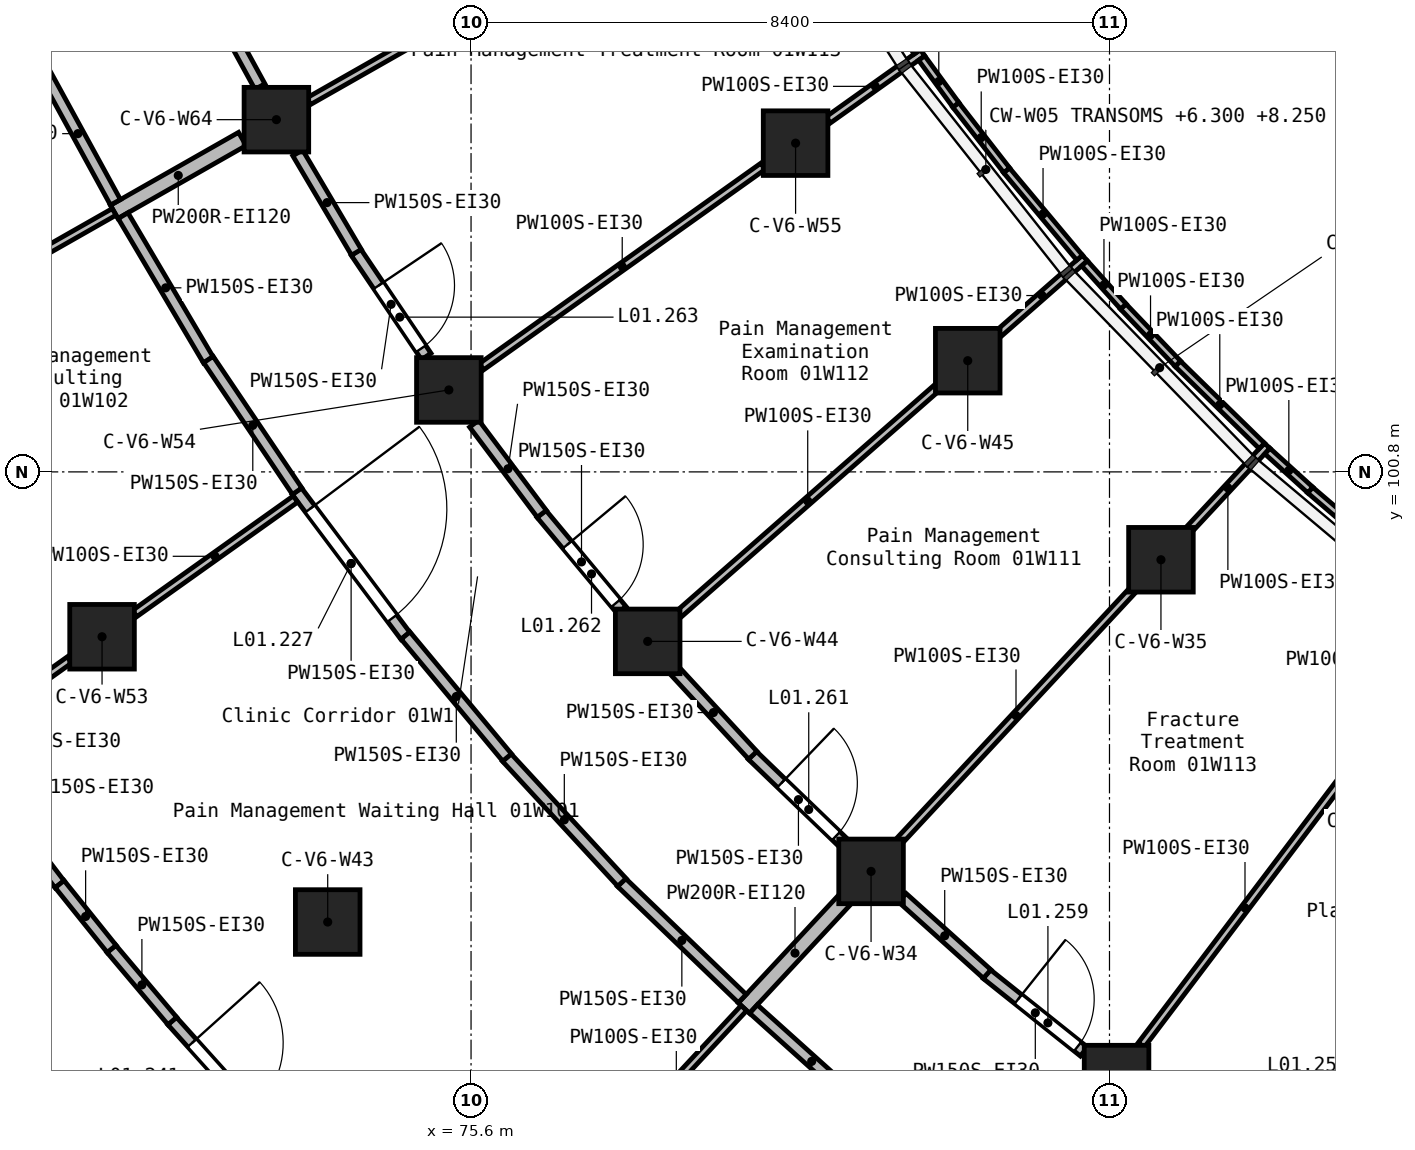
"""IFC4 building model, lengths in metres.
Left out: names, types, materials, properties, quantities, classifications, styles, units other than length and angle.
Written with IfcOpenShell. Run it as: python <this file> out.ifc"""

import sys

from ifc_helpers import new_model, si_unit, direction, frame, frame_2d, origin, origin_2d, place, context, subcontext, project, spatial, rectangle, extrude, element, fill, save


model = new_model("IFC4")
c1 = context("Model", 3, precision=1e-05, world=origin(), true_north=direction((0.0, 1.0)))
c2 = subcontext(c1, "Body", "Model", "MODEL_VIEW")
j1 = project(units=[si_unit("LENGTHUNIT", "METRE"), si_unit("PLANEANGLEUNIT", "RADIAN")], contexts=[c1])
p1 = place(None, origin())
s1 = spatial("IfcSite", under=j1, at=p1, CompositionType="ELEMENT")
p2 = place(p1, origin())
s2 = spatial("IfcBuilding", under=s1, at=p2, CompositionType="ELEMENT")
p3 = place(p2, frame((0.0, 0.0, 5.4)))
s3 = spatial("IfcBuildingStorey", under=s2, at=p3, CompositionType="ELEMENT", Elevation=5.4)
for number, where, z_axis, x_axis in (
    (1, (70.745, 98.631, 0.0), (0.0, 0.0, 1.0), (1.0, 0.0, 0.0)),
    (2, (73.039, 105.434, 0.0), (0.0, 0.0, 1.0), (1.0, 0.0, 0.0)),
    (3, (73.714, 94.878, 0.0), (0.0, 0.0, 1.0), (1.0, 0.0, 0.0)),
    (4, (75.308, 101.878, 0.0), (0.0, 0.0, 1.0), (1.0, 0.0, 0.0)),
    (5, (77.924, 98.57, 0.0), (0.0, 0.0, 1.0), (1.0, 0.0, 0.0)),
    (6, (79.87, 105.125, 0.0), (0.0, 0.0, 1.0), (1.0, 0.0, 0.0)),
    (7, (80.863, 95.544, 0.0), (0.0, 0.0, 1.0), (1.0, 0.0, 0.0)),
    (8, (82.135, 102.263, 0.0), (0.0, 0.0, 1.0), (1.0, 0.0, 0.0)),
    (9, (84.093, 92.831, 0.0), (0.0, 0.0, 1.0), (1.0, 0.0, 0.0)),
    (10, (84.677, 99.644, 0.0), (0.0, 0.0, 1.0), (1.0, 0.0, 0.0)),
):
    element("IfcColumn", number, at=place(p3, frame(where, z_axis=z_axis, x_axis=x_axis)), inside=s3, PredefinedType="COLUMN", context=c2, shape_type="SweptSolid", body=[
        extrude(rectangle(XDim=0.85, YDim=0.85, at=origin_2d()), origin(), (0.0, 0.0, 1.0), 4.5),
    ])
p4 = place(p3, frame((70.905, 104.221, 0.0), z_axis=(0.0, 0.0, 1.0), x_axis=(0.869256176146, 0.494361912198, 0.0)))
e11 = element("IfcWall", 11, at=p4, inside=s3, PredefinedType="SOLIDWALL", context=c2, shape_type="SweptSolid", body=[
    extrude(rectangle(XDim=1.939, YDim=0.2, at=frame_2d((0.97, 0.0))), origin(), (0.0, 0.0, 1.0), 4.15),
])
p5 = place(p3, frame((79.19, 93.746, 0.0), z_axis=(0.0, 0.0, 1.0), x_axis=(0.681171780306, 0.732123627344, 0.0)))
e12 = element("IfcWall", 12, at=p5, inside=s3, PredefinedType="SOLIDWALL", context=c2, shape_type="SweptSolid", body=[
    extrude(rectangle(XDim=1.974, YDim=0.2, at=frame_2d((0.987, 0.0))), origin(), (0.0, 0.0, 1.0), 4.15),
])
p6 = place(p3, frame((73.307, 100.547, 0.0), z_axis=(0.0, 0.0, 1.0), x_axis=(0.600377090661, -0.799717043091, 0.0)))
e13 = element("IfcWall", 13, at=p6, inside=s3, PredefinedType="PARTITIONING", context=c2, shape_type="SweptSolid", body=[
    extrude(rectangle(XDim=2.382, YDim=0.15, at=frame_2d((1.191, 0.0))), origin(), (0.0, 0.0, 1.0), 4.15),
])
p7 = place(p6, frame((0.291, 0.0, 0.0)))
e14 = element("IfcOpeningElement", 14, at=p7, cuts=e13, PredefinedType="OPENING", context=c2, shape_type="SweptSolid", body=[
    extrude(rectangle(XDim=1.8, YDim=2.1, at=frame_2d((0.9, 1.05))), frame((0.0, 0.085, 0.0), z_axis=(0.0, -1.0, 0.0), x_axis=(1.0, 0.0, 0.0)), (0.0, 0.0, 1.0), 0.17),
])
p8 = place(p3, frame((77.579, 95.4, 0.0), z_axis=(0.0, 0.0, 1.0), x_axis=(0.720594722174, -0.693356507415, 0.0)))
e15 = element("IfcWall", 15, at=p8, inside=s3, PredefinedType="PARTITIONING", context=c2, shape_type="SweptSolid", body=[
    extrude(rectangle(XDim=2.205, YDim=0.15, at=frame_2d((1.103, 0.0))), origin(), (0.0, 0.0, 1.0), 4.15),
])
p9 = place(p3, frame((76.069, 97.043, 0.0), z_axis=(0.0, 0.0, 1.0), x_axis=(0.678030610295, -0.735033666918, 0.0)))
e16 = element("IfcWall", 16, at=p9, inside=s3, PredefinedType="PARTITIONING", context=c2, shape_type="SweptSolid", body=[
    extrude(rectangle(XDim=2.236, YDim=0.15, at=frame_2d((1.118, 0.0))), origin(), (0.0, 0.0, 1.0), 4.15),
])
p10 = place(p3, frame((71.021, 104.171, 0.0), z_axis=(0.0, 0.0, 1.0), x_axis=(0.50873677225, -0.860922119916, 0.0)))
e17 = element("IfcWall", 17, at=p10, inside=s3, PredefinedType="PARTITIONING", context=c2, shape_type="SweptSolid", body=[
    extrude(rectangle(XDim=2.205, YDim=0.15, at=frame_2d((1.103, 0.0))), origin(), (0.0, 0.0, 1.0), 4.15),
])
p11 = place(p3, frame((79.316, 93.733, 0.0), z_axis=(0.0, 0.0, 1.0), x_axis=(0.74346507851, -0.668774758073, 0.0)))
e18 = element("IfcWall", 18, at=p11, inside=s3, PredefinedType="PARTITIONING", context=c2, shape_type="SweptSolid", body=[
    extrude(rectangle(XDim=2.059, YDim=0.15, at=frame_2d((1.03, 0.0))), origin(), (0.0, 0.0, 1.0), 4.15),
])
p12 = place(p3, frame((72.145, 102.278, 0.0), z_axis=(0.0, 0.0, 1.0), x_axis=(0.558900636953, -0.829234633873, 0.0)))
e19 = element("IfcWall", 19, at=p12, inside=s3, PredefinedType="PARTITIONING", context=c2, shape_type="SweptSolid", body=[
    extrude(rectangle(XDim=2.089, YDim=0.15, at=frame_2d((1.044, 0.0))), origin(), (0.0, 0.0, 1.0), 4.15),
])
p13 = place(p3, frame((74.738, 98.647, 0.0), z_axis=(0.0, 0.0, 1.0), x_axis=(0.640000381719, -0.768374590548, 0.0)))
e20 = element("IfcWall", 20, at=p13, inside=s3, PredefinedType="PARTITIONING", context=c2, shape_type="SweptSolid", body=[
    extrude(rectangle(XDim=2.088, YDim=0.15, at=frame_2d((1.044, 0.0))), origin(), (0.0, 0.0, 1.0), 4.15),
])
p14 = place(p3, frame((69.933, 106.153, 0.0), z_axis=(0.0, 0.0, 1.0), x_axis=(0.479964929401, -0.877287676047, 0.0)))
e21 = element("IfcWall", 21, at=p14, inside=s3, PredefinedType="PARTITIONING", context=c2, shape_type="SweptSolid", body=[
    extrude(rectangle(XDim=2.059, YDim=0.15, at=frame_2d((1.03, 0.0))), origin(), (0.0, 0.0, 1.0), 4.15),
])
p15 = place(p3, frame((74.086, 103.69, 0.0), z_axis=(0.0, 0.0, 1.0), x_axis=(0.558985889655, -0.829177167538, 0.0)))
e22 = element("IfcWall", 22, at=p15, inside=s3, PredefinedType="PARTITIONING", context=c2, shape_type="SweptSolid", body=[
    extrude(rectangle(XDim=1.654, YDim=0.15, at=frame_2d((0.827, 0.0))), origin(), (0.0, 0.0, 1.0), 4.15),
])
p16 = place(p15, frame((0.53, 0.0, 0.0)))
e23 = element("IfcOpeningElement", 23, at=p16, cuts=e22, PredefinedType="OPENING", context=c2, shape_type="SweptSolid", body=[
    extrude(rectangle(XDim=1.0, YDim=2.1, at=frame_2d((0.5, 1.05))), frame((0.0, 0.085, 0.0), z_axis=(0.0, -1.0, 0.0), x_axis=(1.0, 0.0, 0.0)), (0.0, 0.0, 1.0), 0.17),
])
p17 = place(p3, frame((82.385, 94.194, 0.0), z_axis=(0.0, 0.0, 1.0), x_axis=(0.781756052881, -0.623584375833, 0.0)))
e24 = element("IfcWall", 24, at=p17, inside=s3, PredefinedType="PARTITIONING", context=c2, shape_type="SweptSolid", body=[
    extrude(rectangle(XDim=1.636, YDim=0.15, at=frame_2d((0.818, 0.0))), origin(), (0.0, 0.0, 1.0), 4.15),
])
p18 = place(p17, frame((0.53, 0.0, 0.0)))
e25 = element("IfcOpeningElement", 25, at=p18, cuts=e24, PredefinedType="OPENING", context=c2, shape_type="SweptSolid", body=[
    extrude(rectangle(XDim=1.0, YDim=2.1, at=frame_2d((0.5, 1.05))), frame((0.0, 0.085, 0.0), z_axis=(0.0, -1.0, 0.0), x_axis=(1.0, 0.0, 0.0)), (0.0, 0.0, 1.0), 0.17),
])
p19 = place(p3, frame((79.301, 97.072, 0.0), z_axis=(0.0, 0.0, 1.0), x_axis=(0.720465115712, -0.69349118022, 0.0)))
e26 = element("IfcWall", 26, at=p19, inside=s3, PredefinedType="PARTITIONING", context=c2, shape_type="SweptSolid", body=[
    extrude(rectangle(XDim=1.684, YDim=0.15, at=frame_2d((0.842, 0.0))), origin(), (0.0, 0.0, 1.0), 4.15),
])
p20 = place(p19, frame((0.53, 0.0, 0.0)))
e27 = element("IfcOpeningElement", 27, at=p20, cuts=e26, PredefinedType="OPENING", context=c2, shape_type="SweptSolid", body=[
    extrude(rectangle(XDim=1.0, YDim=2.1, at=frame_2d((0.5, 1.05))), frame((0.0, 0.085, 0.0), z_axis=(0.0, -1.0, 0.0), x_axis=(1.0, 0.0, 0.0)), (0.0, 0.0, 1.0), 0.17),
])
p21 = place(p3, frame((78.27, 98.195, 0.0), z_axis=(0.0, 0.0, 1.0), x_axis=(0.678273469528, -0.73480956753, 0.0)))
e28 = element("IfcWall", 28, at=p21, inside=s3, PredefinedType="PARTITIONING", context=c2, shape_type="SweptSolid", body=[
    extrude(rectangle(XDim=1.529, YDim=0.15, at=frame_2d((0.764, 0.0))), origin(), (0.0, 0.0, 1.0), 4.15),
])
p22 = place(p3, frame((76.526, 100.249, 0.0), z_axis=(0.0, 0.0, 1.0), x_axis=(0.640038659854, -0.768342706019, 0.0)))
e29 = element("IfcWall", 29, at=p22, inside=s3, PredefinedType="PARTITIONING", context=c2, shape_type="SweptSolid", body=[
    extrude(rectangle(XDim=1.648, YDim=0.15, at=frame_2d((0.824, 0.0))), origin(), (0.0, 0.0, 1.0), 4.15),
])
p23 = place(p22, frame((0.53, 0.0, 0.0)))
e30 = element("IfcOpeningElement", 30, at=p23, cuts=e29, PredefinedType="OPENING", context=c2, shape_type="SweptSolid", body=[
    extrude(rectangle(XDim=1.0, YDim=2.1, at=frame_2d((0.5, 1.05))), frame((0.0, 0.085, 0.0), z_axis=(0.0, -1.0, 0.0), x_axis=(1.0, 0.0, 0.0)), (0.0, 0.0, 1.0), 0.17),
])
p24 = place(p3, frame((73.319, 104.997, 0.0), z_axis=(0.0, 0.0, 1.0), x_axis=(0.508740142918, -0.86092012811, 0.0)))
e31 = element("IfcWall", 31, at=p24, inside=s3, PredefinedType="PARTITIONING", context=c2, shape_type="SweptSolid", body=[
    extrude(rectangle(XDim=1.519, YDim=0.15, at=frame_2d((0.759, 0.0))), origin(), (0.0, 0.0, 1.0), 4.15),
])
p25 = place(p3, frame((75.641, 101.434, 0.0), z_axis=(0.0, 0.0, 1.0), x_axis=(0.60023710435, -0.799822116825, 0.0)))
e32 = element("IfcWall", 32, at=p25, inside=s3, PredefinedType="PARTITIONING", context=c2, shape_type="SweptSolid", body=[
    extrude(rectangle(XDim=1.483, YDim=0.15, at=frame_2d((0.741, 0.0))), origin(), (0.0, 0.0, 1.0), 4.15),
])
p26 = place(p3, frame((81.273, 95.199, 0.0), z_axis=(0.0, 0.0, 1.0), x_axis=(0.743576936712, -0.668650386368, 0.0)))
e33 = element("IfcWall", 33, at=p26, inside=s3, PredefinedType="PARTITIONING", context=c2, shape_type="SweptSolid", body=[
    extrude(rectangle(XDim=1.502, YDim=0.15, at=frame_2d((0.751, 0.0))), origin(), (0.0, 0.0, 1.0), 4.15),
])
p27 = place(p3, frame((72.077, 107.232, 0.0), z_axis=(0.0, 0.0, 1.0), x_axis=(0.480041086357, -0.877246006209, 0.0)))
e34 = element("IfcWall", 34, at=p27, inside=s3, PredefinedType="PARTITIONING", context=c2, shape_type="SweptSolid", body=[
    extrude(rectangle(XDim=1.553, YDim=0.15, at=frame_2d((0.777, 0.0))), origin(), (0.0, 0.0, 1.0), 4.15),
])
p28 = place(p3, frame((71.667, 93.577, 0.0), z_axis=(0.0, 0.0, 1.0), x_axis=(0.668733315137, -0.743502355898, 0.0)))
e35 = element("IfcWall", 35, at=p28, inside=s3, PredefinedType="PARTITIONING", context=c2, shape_type="SweptSolid", body=[
    extrude(rectangle(XDim=1.982, YDim=0.15, at=frame_2d((0.991, 0.0))), origin(), (0.0, 0.0, 1.0), 4.15),
])
p29 = place(p28, frame((0.391, 0.0, 0.0)))
e36 = element("IfcOpeningElement", 36, at=p29, cuts=e35, PredefinedType="OPENING", context=c2, shape_type="SweptSolid", body=[
    extrude(rectangle(XDim=1.2, YDim=2.1, at=frame_2d((0.6, 1.05))), frame((0.0, 0.085, 0.0), z_axis=(0.0, -1.0, 0.0), x_axis=(1.0, 0.0, 0.0)), (0.0, 0.0, 1.0), 0.17),
])
p30 = place(p3, frame((69.433, 96.362, 0.0), z_axis=(0.0, 0.0, 1.0), x_axis=(0.606457599152, -0.795115828311, 0.0)))
e37 = element("IfcWall", 37, at=p30, inside=s3, PredefinedType="PARTITIONING", context=c2, shape_type="SweptSolid", body=[
    extrude(rectangle(XDim=1.242, YDim=0.15, at=frame_2d((0.621, 0.0))), origin(), (0.0, 0.0, 1.0), 4.15),
])
p31 = place(p3, frame((70.869, 94.525, 0.0), z_axis=(0.0, 0.0, 1.0), x_axis=(0.645236922374, -0.763982535144, 0.0)))
e38 = element("IfcWall", 38, at=p31, inside=s3, PredefinedType="PARTITIONING", context=c2, shape_type="SweptSolid", body=[
    extrude(rectangle(XDim=1.242, YDim=0.15, at=frame_2d((0.621, 0.0))), origin(), (0.0, 0.0, 1.0), 4.15),
])
p32 = place(p3, frame((70.187, 95.377, 0.0), z_axis=(0.0, 0.0, 1.0), x_axis=(0.626301399266, -0.779581013928, 0.0)))
e39 = element("IfcWall", 39, at=p32, inside=s3, PredefinedType="PARTITIONING", context=c2, shape_type="SweptSolid", body=[
    extrude(rectangle(XDim=1.093, YDim=0.15, at=frame_2d((0.546, 0.0))), origin(), (0.0, 0.0, 1.0), 4.15),
])
p33 = place(p3, frame((84.418, 93.26, 0.0), z_axis=(0.0, 0.0, 1.0), x_axis=(0.603501117064, 0.797362152163, 0.0)))
e40 = element("IfcWall", 40, at=p33, inside=s3, PredefinedType="PARTITIONING", context=c2, shape_type="SweptSolid", body=[
    extrude(rectangle(XDim=4.522, YDim=0.1, at=frame_2d((2.261, 0.0))), origin(), (0.0, 0.0, 1.0), 4.15),
])
p34 = place(p3, frame((78.338, 98.933, 0.0), z_axis=(0.0, 0.0, 1.0), x_axis=(0.751823288541, 0.659364650863, 0.0)))
e41 = element("IfcWall", 41, at=p34, inside=s3, PredefinedType="PARTITIONING", context=c2, shape_type="SweptSolid", body=[
    extrude(rectangle(XDim=4.5, YDim=0.1, at=frame_2d((2.25, 0.0))), origin(), (0.0, 0.0, 1.0), 4.15),
])
p35 = place(p3, frame((82.549, 102.626, 0.0), z_axis=(0.0, 0.0, 1.0), x_axis=(0.751798799024, 0.659392573347, 0.0)))
e42 = element("IfcWall", 42, at=p35, inside=s3, PredefinedType="PARTITIONING", context=c2, shape_type="SweptSolid", body=[
    extrude(rectangle(XDim=1.498, YDim=0.1, at=frame_2d((0.749, 0.0))), origin(), (0.0, 0.0, 1.0), 4.15),
])
p36 = place(p3, frame((75.736, 102.183, 0.0), z_axis=(0.0, 0.0, 1.0), x_axis=(0.8147152487, 0.579861245072, 0.0)))
e43 = element("IfcWall", 43, at=p36, inside=s3, PredefinedType="PARTITIONING", context=c2, shape_type="SweptSolid", body=[
    extrude(rectangle(XDim=4.548, YDim=0.1, at=frame_2d((2.274, 0.0))), origin(), (0.0, 0.0, 1.0), 4.15),
])
p37 = place(p3, frame((80.298, 105.43, 0.0), z_axis=(0.0, 0.0, 1.0), x_axis=(0.814728250396, 0.579842977027, 0.0)))
e44 = element("IfcWall", 44, at=p37, inside=s3, PredefinedType="PARTITIONING", context=c2, shape_type="SweptSolid", body=[
    extrude(rectangle(XDim=1.524, YDim=0.1, at=frame_2d((0.762, 0.0))), origin(), (0.0, 0.0, 1.0), 4.15),
])
p38 = place(p3, frame((81.227, 95.935, 0.0), z_axis=(0.0, 0.0, 1.0), x_axis=(0.681211440492, 0.732086725288, 0.0)))
e45 = element("IfcWall", 45, at=p38, inside=s3, PredefinedType="PARTITIONING", context=c2, shape_type="SweptSolid", body=[
    extrude(rectangle(XDim=4.53, YDim=0.1, at=frame_2d((2.265, 0.0))), origin(), (0.0, 0.0, 1.0), 4.15),
])
p39 = place(p3, frame((85.041, 100.034, 0.0), z_axis=(0.0, 0.0, 1.0), x_axis=(0.681296599079, 0.732007475428, 0.0)))
e46 = element("IfcWall", 46, at=p39, inside=s3, PredefinedType="PARTITIONING", context=c2, shape_type="SweptSolid", body=[
    extrude(rectangle(XDim=1.517, YDim=0.1, at=frame_2d((0.758, 0.0))), origin(), (0.0, 0.0, 1.0), 4.15),
])
p40 = place(p3, frame((73.463, 105.676, 0.0), z_axis=(0.0, 0.0, 1.0), x_axis=(0.8692549769, 0.494364020874, 0.0)))
e47 = element("IfcWall", 47, at=p40, inside=s3, PredefinedType="PARTITIONING", context=c2, shape_type="SweptSolid", body=[
    extrude(rectangle(XDim=4.625, YDim=0.1, at=frame_2d((2.312, 0.0))), origin(), (0.0, 0.0, 1.0), 4.15),
])
p41 = place(p3, frame((68.595, 102.907, 0.0), z_axis=(0.0, 0.0, 1.0), x_axis=(0.869270757215, 0.494336272846, 0.0)))
e48 = element("IfcWall", 48, at=p41, inside=s3, PredefinedType="PARTITIONING", context=c2, shape_type="SweptSolid", body=[
    extrude(rectangle(XDim=2.656, YDim=0.1, at=frame_2d((1.328, 0.0))), origin(), (0.0, 0.0, 1.0), 4.15),
])
p42 = place(p3, frame((77.412, 91.835, 0.0), z_axis=(0.0, 0.0, 1.0), x_axis=(0.681147107729, 0.732146582067, 0.0)))
e49 = element("IfcWall", 49, at=p42, inside=s3, PredefinedType="PARTITIONING", context=c2, shape_type="SweptSolid", body=[
    extrude(rectangle(XDim=2.609, YDim=0.1, at=frame_2d((1.304, 0.0))), origin(), (0.0, 0.0, 1.0), 4.15),
])
p43 = place(p3, frame((68.861, 97.29, 0.0), z_axis=(0.0, 0.0, 1.0), x_axis=(0.814701484378, 0.5798805837, 0.0)))
e50 = element("IfcWall", 50, at=p43, inside=s3, PredefinedType="PARTITIONING", context=c2, shape_type="SweptSolid", body=[
    extrude(rectangle(XDim=1.787, YDim=0.1, at=frame_2d((0.894, 0.0))), origin(), (0.0, 0.0, 1.0), 4.15),
])
p44 = place(p3, frame((71.173, 98.936, 0.0), z_axis=(0.0, 0.0, 1.0), x_axis=(0.814672160951, 0.579921779355, 0.0)))
e51 = element("IfcWall", 51, at=p44, inside=s3, PredefinedType="PARTITIONING", context=c2, shape_type="SweptSolid", body=[
    extrude(rectangle(XDim=2.598, YDim=0.1, at=frame_2d((1.299, 0.0))), origin(), (0.0, 0.0, 1.0), 4.15),
])
p45 = place(p3, frame((84.897, 102.224, 0.0), z_axis=(0.0, 0.0, 1.0), x_axis=(0.715491637519, -0.698621297013, 0.0)))
e52 = element("IfcWall", 52, at=p45, inside=s3, PredefinedType="PARTITIONING", context=c2, shape_type="SweptSolid", body=[
    extrude(rectangle(XDim=1.548, YDim=0.1, at=frame_2d((0.774, 0.0))), origin(), (0.0, 0.0, 1.0), 4.15),
])
p46 = place(p3, frame((82.645, 104.768, 0.0), z_axis=(0.0, 0.0, 1.0), x_axis=(0.641529064264, -0.767098728785, 0.0)))
e53 = element("IfcWall", 53, at=p46, inside=s3, PredefinedType="PARTITIONING", context=c2, shape_type="SweptSolid", body=[
    extrude(rectangle(XDim=1.499, YDim=0.1, at=frame_2d((0.75, 0.0))), origin(), (0.0, 0.0, 1.0), 4.15),
])
p47 = place(p3, frame((80.657, 107.527, 0.0), z_axis=(0.0, 0.0, 1.0), x_axis=(0.561086061718, -0.827757471332, 0.0)))
e54 = element("IfcWall", 54, at=p47, inside=s3, PredefinedType="PARTITIONING", context=c2, shape_type="SweptSolid", body=[
    extrude(rectangle(XDim=1.452, YDim=0.1, at=frame_2d((0.726, 0.0))), origin(), (0.0, 0.0, 1.0), 4.15),
])
p48 = place(p3, frame((81.977, 105.628, 0.0), z_axis=(0.0, 0.0, 1.0), x_axis=(0.61437453726, -0.78901452963, 0.0)))
e55 = element("IfcWall", 55, at=p48, inside=s3, PredefinedType="PARTITIONING", context=c2, shape_type="SweptSolid", body=[
    extrude(rectangle(XDim=1.09, YDim=0.1, at=frame_2d((0.545, 0.0))), origin(), (0.0, 0.0, 1.0), 4.15),
])
p49 = place(p3, frame((84.18, 102.976, 0.0), z_axis=(0.0, 0.0, 1.0), x_axis=(0.691094804644, -0.722764118502, 0.0)))
e56 = element("IfcWall", 56, at=p49, inside=s3, PredefinedType="PARTITIONING", context=c2, shape_type="SweptSolid", body=[
    extrude(rectangle(XDim=1.041, YDim=0.1, at=frame_2d((0.521, 0.0))), origin(), (0.0, 0.0, 1.0), 4.15),
])
p50 = place(p3, frame((86.64, 100.562, 0.0), z_axis=(0.0, 0.0, 1.0), x_axis=(0.759638737838, -0.650345283658, 0.0)))
e57 = element("IfcWall", 57, at=p50, inside=s3, PredefinedType="PARTITIONING", context=c2, shape_type="SweptSolid", body=[
    extrude(rectangle(XDim=0.992, YDim=0.1, at=frame_2d((0.496, 0.0))), origin(), (0.0, 0.0, 1.0), 4.15),
])
p51 = place(p3, frame((83.672, 103.543, 0.0), z_axis=(0.0, 0.0, 1.0), x_axis=(0.66903540409, -0.743230534945, 0.0)))
e58 = element("IfcWall", 58, at=p51, inside=s3, PredefinedType="PARTITIONING", context=c2, shape_type="SweptSolid", body=[
    extrude(rectangle(XDim=0.763, YDim=0.1, at=frame_2d((0.382, 0.0))), origin(), (0.0, 0.0, 1.0), 4.15),
])
p52 = place(p3, frame((81.529, 106.244, 0.0), z_axis=(0.0, 0.0, 1.0), x_axis=(0.590281268128, -0.807197636578, 0.0)))
e59 = element("IfcWall", 59, at=p52, inside=s3, PredefinedType="PARTITIONING", context=c2, shape_type="SweptSolid", body=[
    extrude(rectangle(XDim=0.763, YDim=0.1, at=frame_2d((0.382, 0.0))), origin(), (0.0, 0.0, 1.0), 4.15),
])
p53 = place(p3, frame((86.077, 101.074, 0.0), z_axis=(0.0, 0.0, 1.0), x_axis=(0.740693092669, -0.671843540173, 0.0)))
e60 = element("IfcWall", 60, at=p53, inside=s3, PredefinedType="PARTITIONING", context=c2, shape_type="SweptSolid", body=[
    extrude(rectangle(XDim=0.762, YDim=0.1, at=frame_2d((0.381, 0.0))), origin(), (0.0, 0.0, 1.0), 4.15),
])
p54 = place(p7, origin())
e61 = element("IfcDoor", 61, at=p54, inside=s3, OperationType="DOUBLE_DOOR_SINGLE_SWING", PredefinedType="DOOR", context=c2, shape_type="SweptSolid", body=[
    extrude(rectangle(XDim=1.8, YDim=2.1, at=frame_2d((0.9, 1.05))), frame((0.0, 0.025, 0.0), z_axis=(0.0, -1.0, 0.0), x_axis=(1.0, 0.0, 0.0)), (0.0, 0.0, 1.0), 0.05),
])
fill(e14, e61)
p55 = place(p29, frame((1.2, 0.0, 0.0), z_axis=(0.0, 0.0, 1.0), x_axis=(-1.0, 0.0, 0.0)))
e62 = element("IfcDoor", 62, at=p55, inside=s3, OperationType="SINGLE_SWING_RIGHT", PredefinedType="DOOR", context=c2, shape_type="SweptSolid", body=[
    extrude(rectangle(XDim=1.2, YDim=2.1, at=frame_2d((0.6, 1.05))), frame((0.0, 0.025, 0.0), z_axis=(0.0, -1.0, 0.0), x_axis=(1.0, 0.0, 0.0)), (0.0, 0.0, 1.0), 0.05),
])
fill(e36, e62)
p56 = place(p18, origin())
e63 = element("IfcDoor", 63, at=p56, inside=s3, OperationType="SINGLE_SWING_RIGHT", PredefinedType="DOOR", context=c2, shape_type="SweptSolid", body=[
    extrude(rectangle(XDim=1.0, YDim=2.1, at=frame_2d((0.5, 1.05))), frame((0.0, 0.025, 0.0), z_axis=(0.0, -1.0, 0.0), x_axis=(1.0, 0.0, 0.0)), (0.0, 0.0, 1.0), 0.05),
])
fill(e25, e63)
p57 = place(p20, origin())
e64 = element("IfcDoor", 64, at=p57, inside=s3, OperationType="SINGLE_SWING_RIGHT", PredefinedType="DOOR", context=c2, shape_type="SweptSolid", body=[
    extrude(rectangle(XDim=1.0, YDim=2.1, at=frame_2d((0.5, 1.05))), frame((0.0, 0.025, 0.0), z_axis=(0.0, -1.0, 0.0), x_axis=(1.0, 0.0, 0.0)), (0.0, 0.0, 1.0), 0.05),
])
fill(e27, e64)
p58 = place(p23, origin())
e65 = element("IfcDoor", 65, at=p58, inside=s3, OperationType="SINGLE_SWING_RIGHT", PredefinedType="DOOR", context=c2, shape_type="SweptSolid", body=[
    extrude(rectangle(XDim=1.0, YDim=2.1, at=frame_2d((0.5, 1.05))), frame((0.0, 0.025, 0.0), z_axis=(0.0, -1.0, 0.0), x_axis=(1.0, 0.0, 0.0)), (0.0, 0.0, 1.0), 0.05),
])
fill(e30, e65)
p59 = place(p16, origin())
e66 = element("IfcDoor", 66, at=p59, inside=s3, OperationType="SINGLE_SWING_RIGHT", PredefinedType="DOOR", context=c2, shape_type="SweptSolid", body=[
    extrude(rectangle(XDim=1.0, YDim=2.1, at=frame_2d((0.5, 1.05))), frame((0.0, 0.025, 0.0), z_axis=(0.0, -1.0, 0.0), x_axis=(1.0, 0.0, 0.0)), (0.0, 0.0, 1.0), 0.05),
])
fill(e23, e66)
save(model, sys.argv[1])
